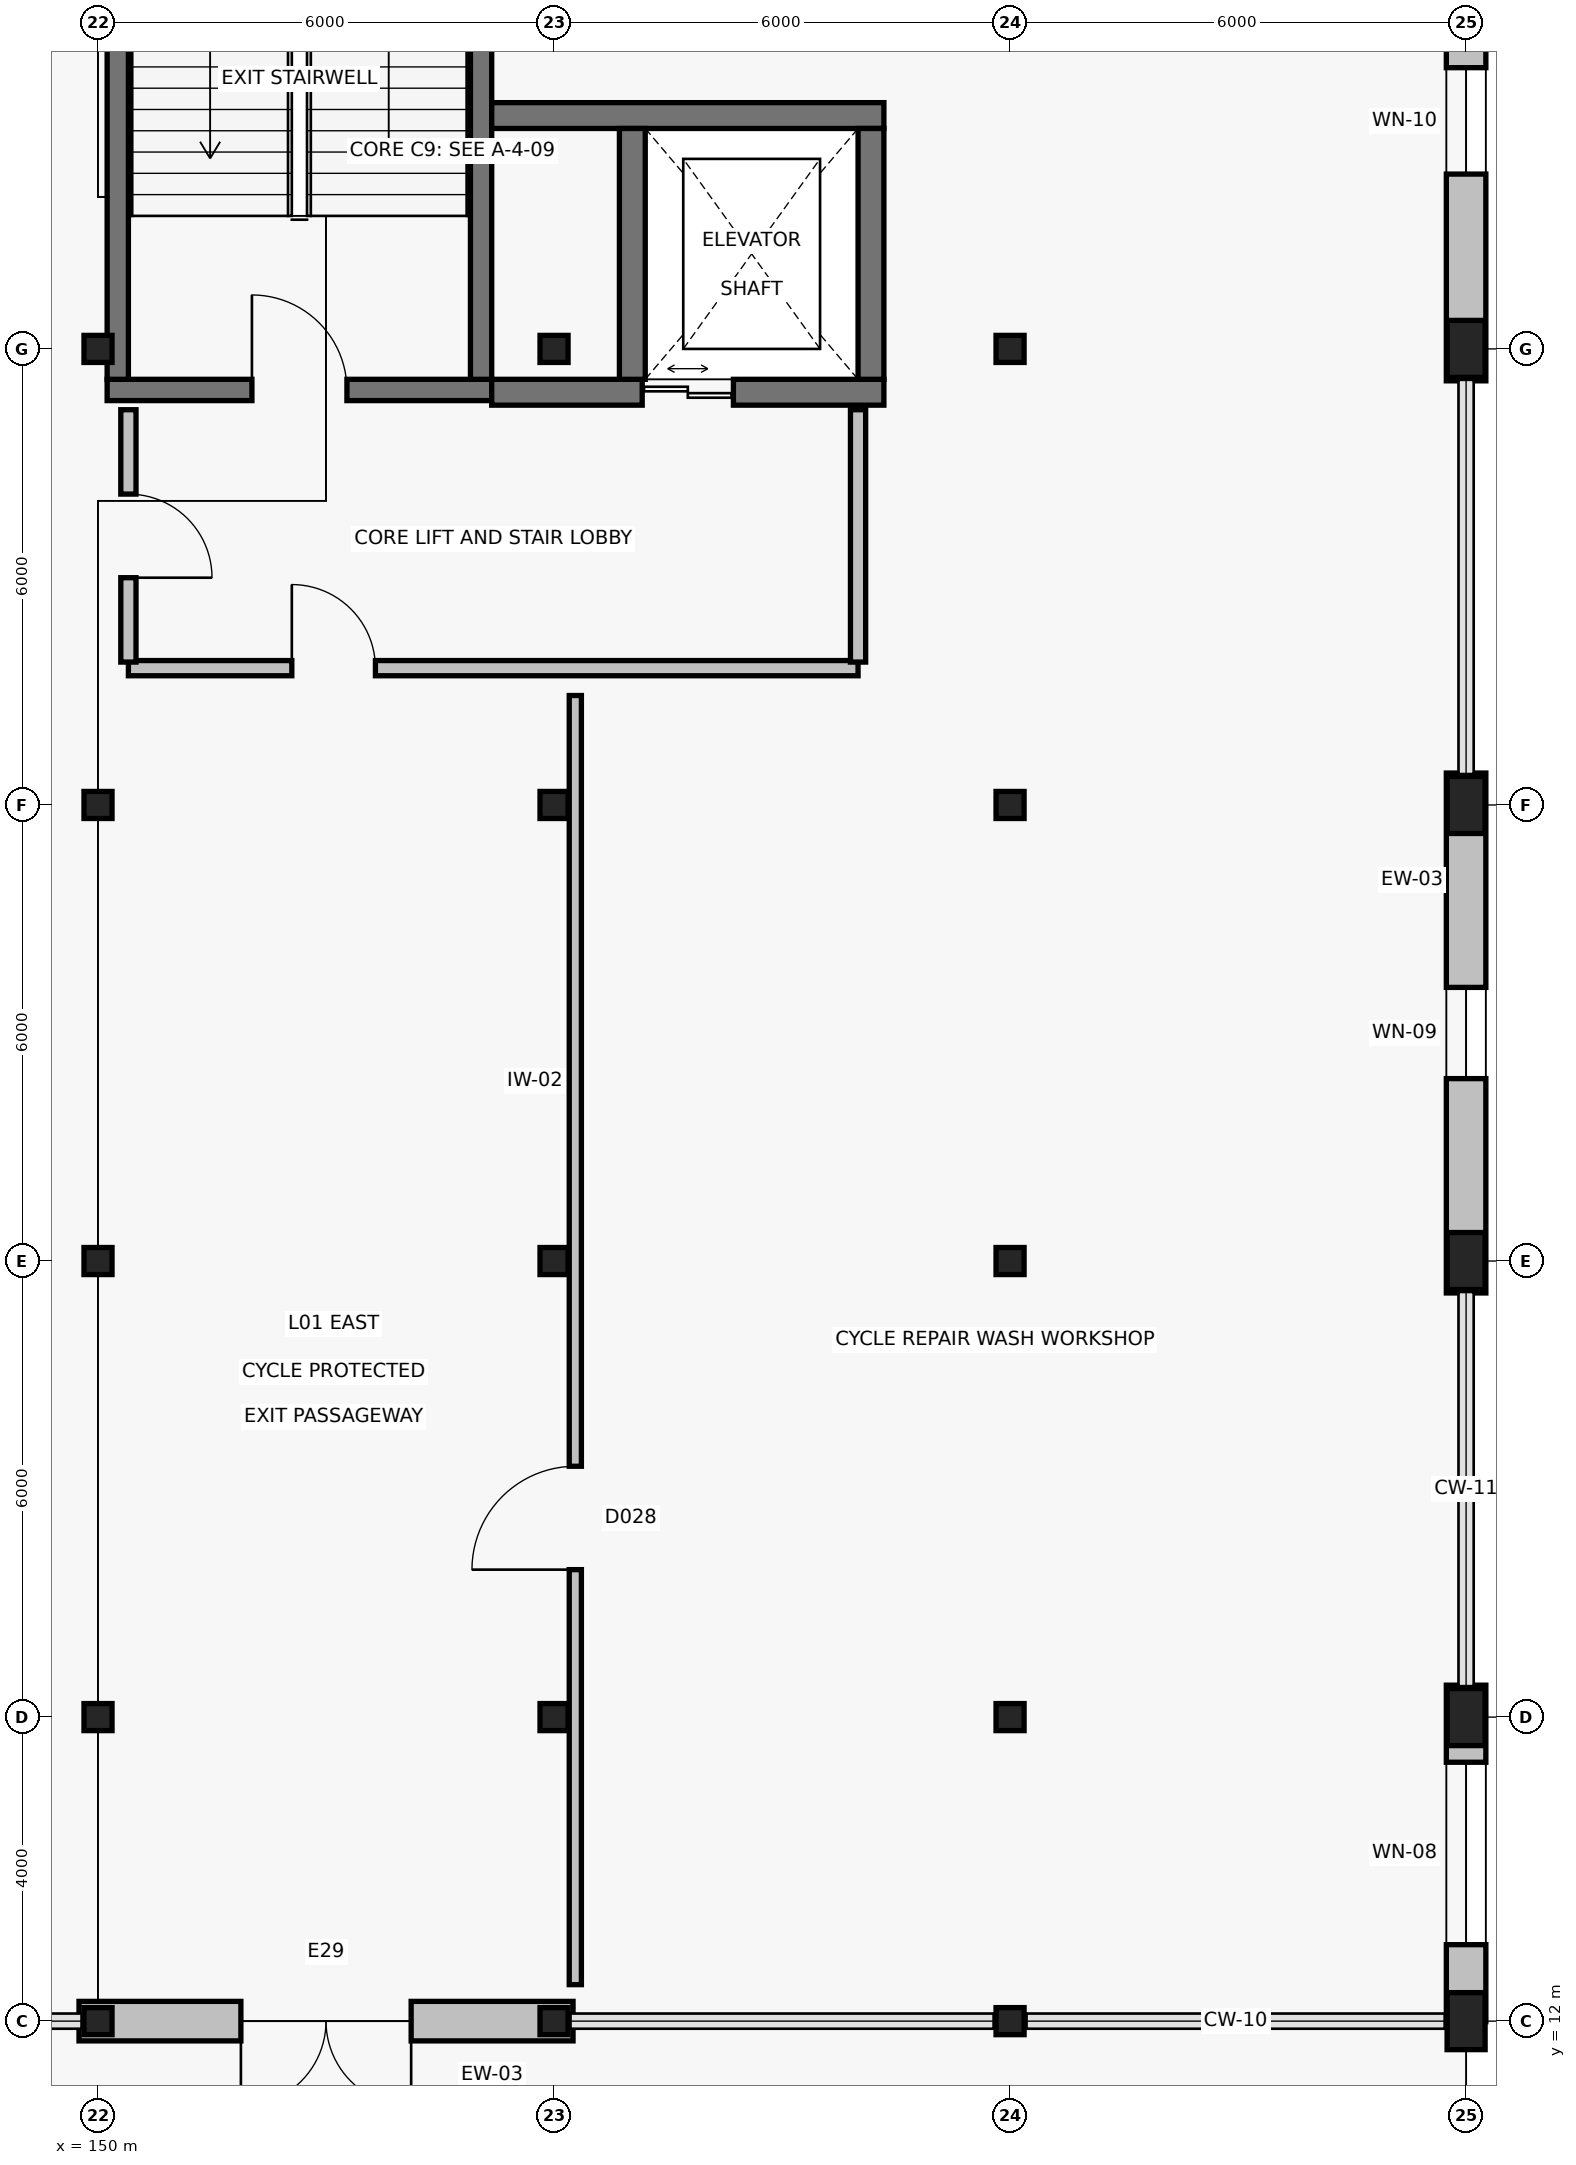
"""IFC4 building model, lengths in metres.
Left out: names, types, materials, properties, quantities, classifications, styles, units other than length and angle.
Written with IfcOpenShell. Run it as: python <this file> out.ifc"""

import sys

from ifc_helpers import new_model, si_unit, direction, frame, frame_2d, origin, origin_2d, place, context, subcontext, project, spatial, rectangle, i_section, extrude, element, fill, save


model = new_model("IFC4")
c1 = context("Model", 3, precision=1e-05, world=origin(), true_north=direction((0.0, 1.0)))
c2 = subcontext(c1, "Body", "Model", "MODEL_VIEW")
j1 = project(units=[si_unit("LENGTHUNIT", "METRE"), si_unit("PLANEANGLEUNIT", "RADIAN")], contexts=[c1])
p1 = place(None, origin())
s1 = spatial("IfcSite", under=j1, at=p1, CompositionType="ELEMENT")
p2 = place(p1, origin())
s2 = spatial("IfcBuilding", under=s1, at=p2, CompositionType="ELEMENT")
p3 = place(p2, origin())
s3 = spatial("IfcBuildingStorey", under=s2, at=p3, CompositionType="ELEMENT", Elevation=0.0)
for number, where, z_axis, x_axis in (
    (1, (150.0, 12.0, 0.0), (0.0, 0.0, 1.0), (1.0, 0.0, 0.0)),
    (2, (150.0, 16.0, 0.0), (0.0, 0.0, 1.0), (1.0, 0.0, 0.0)),
    (3, (150.0, 22.0, 0.0), (0.0, 0.0, 1.0), (1.0, 0.0, 0.0)),
    (4, (150.0, 28.0, 0.0), (0.0, 0.0, 1.0), (1.0, 0.0, 0.0)),
    (5, (150.0, 34.0, 0.0), (0.0, 0.0, 1.0), (1.0, 0.0, 0.0)),
    (6, (156.0, 12.0, 0.0), (0.0, 0.0, 1.0), (1.0, 0.0, 0.0)),
    (7, (156.0, 16.0, 0.0), (0.0, 0.0, 1.0), (1.0, 0.0, 0.0)),
    (8, (156.0, 22.0, 0.0), (0.0, 0.0, 1.0), (1.0, 0.0, 0.0)),
    (9, (156.0, 28.0, 0.0), (0.0, 0.0, 1.0), (1.0, 0.0, 0.0)),
    (10, (156.0, 34.0, 0.0), (0.0, 0.0, 1.0), (1.0, 0.0, 0.0)),
    (11, (162.0, 12.0, 0.0), (0.0, 0.0, 1.0), (1.0, 0.0, 0.0)),
    (12, (162.0, 16.0, 0.0), (0.0, 0.0, 1.0), (1.0, 0.0, 0.0)),
    (13, (162.0, 22.0, 0.0), (0.0, 0.0, 1.0), (1.0, 0.0, 0.0)),
    (14, (162.0, 28.0, 0.0), (0.0, 0.0, 1.0), (1.0, 0.0, 0.0)),
    (15, (162.0, 34.0, 0.0), (0.0, 0.0, 1.0), (1.0, 0.0, 0.0)),
):
    element("IfcColumn", number, at=place(p3, frame(where, z_axis=z_axis, x_axis=x_axis)), inside=s3, PredefinedType="COLUMN", context=c2, shape_type="SweptSolid", body=[
        extrude(i_section(OverallWidth=0.369, OverallDepth=0.356, WebThickness=0.011, FlangeThickness=0.018, FilletRadius=0.015, at=origin_2d()), origin(), (0.0, 0.0, 1.0), 6.6),
    ])
for number, where, z_axis, x_axis in (
    (16, (168.0, 12.0, 0.0), (0.0, 0.0, 1.0), (1.0, 0.0, 0.0)),
    (17, (168.0, 16.0, 0.0), (0.0, 0.0, 1.0), (1.0, 0.0, 0.0)),
    (18, (168.0, 22.0, 0.0), (0.0, 0.0, 1.0), (1.0, 0.0, 0.0)),
    (19, (168.0, 28.0, 0.0), (0.0, 0.0, 1.0), (1.0, 0.0, 0.0)),
    (20, (168.0, 34.0, 0.0), (0.0, 0.0, 1.0), (1.0, 0.0, 0.0)),
):
    element("IfcColumn", number, at=place(p3, frame(where, z_axis=z_axis, x_axis=x_axis)), inside=s3, PredefinedType="PILASTER", context=c2, shape_type="SweptSolid", body=[
        extrude(rectangle(XDim=0.5, YDim=0.75, at=origin_2d()), origin(), (0.0, 0.0, 1.0), 6.6),
    ])
p4 = place(p3, frame((156.25, 12.0, 0.0), z_axis=(0.0, 0.0, 1.0), x_axis=(-1.0, 0.0, 0.0)))
e21 = element("IfcWall", 21, at=p4, inside=s3, PredefinedType="SOLIDWALL", context=c2, shape_type="SweptSolid", body=[
    extrude(rectangle(XDim=6.5, YDim=0.52, at=frame_2d((3.25, 0.0))), origin(), (0.0, 0.0, 1.0), 5.761),
])
p5 = place(p4, frame((2.13, 0.0, 0.0)))
e22 = element("IfcOpeningElement", 22, at=p5, cuts=e21, PredefinedType="OPENING", context=c2, shape_type="SweptSolid", body=[
    extrude(rectangle(XDim=2.24, YDim=2.6, at=frame_2d((1.12, 1.3))), frame((0.0, 0.275, 0.0), z_axis=(0.0, -1.0, 0.0), x_axis=(1.0, 0.0, 0.0)), (0.0, 0.0, 1.0), 0.55),
])
p6 = place(p3, frame((168.0, 11.992, 0.0), z_axis=(0.0, 0.0, 1.0), x_axis=(0.0, 1.0, 0.0)))
e23 = element("IfcWall", 23, at=p6, inside=s3, PredefinedType="SOLIDWALL", context=c2, shape_type="SweptSolid", body=[
    extrude(rectangle(XDim=4.428, YDim=0.52, at=frame_2d((2.214, 0.0))), origin(), (0.0, 0.0, 1.0), 5.837),
])
p7 = place(p6, frame((1.014, 0.0, 0.9)))
e24 = element("IfcOpeningElement", 24, at=p7, cuts=e23, PredefinedType="OPENING", context=c2, shape_type="SweptSolid", body=[
    extrude(rectangle(XDim=2.4, YDim=1.8, at=frame_2d((1.2, 0.9))), frame((0.0, 0.275, 0.0), z_axis=(0.0, -1.0, 0.0), x_axis=(1.0, 0.0, 0.0)), (0.0, 0.0, 1.0), 0.55),
])
p8 = place(p3, frame((168.0, 21.58, 0.0), z_axis=(0.0, 0.0, 1.0), x_axis=(0.0, 1.0, 0.0)))
e25 = element("IfcWall", 25, at=p8, inside=s3, PredefinedType="SOLIDWALL", context=c2, shape_type="SweptSolid", body=[
    extrude(rectangle(XDim=6.84, YDim=0.52, at=frame_2d((3.42, 0.0))), origin(), (0.0, 0.0, 1.0), 5.837),
])
p9 = place(p8, frame((2.82, 0.0, 0.9)))
e26 = element("IfcOpeningElement", 26, at=p9, cuts=e25, PredefinedType="OPENING", context=c2, shape_type="SweptSolid", body=[
    extrude(rectangle(XDim=1.2, YDim=2.1, at=frame_2d((0.6, 1.05))), frame((0.0, 0.275, 0.0), z_axis=(0.0, -1.0, 0.0), x_axis=(1.0, 0.0, 0.0)), (0.0, 0.0, 1.0), 0.55),
])
p10 = place(p3, frame((168.0, 33.58, 0.0), z_axis=(0.0, 0.0, 1.0), x_axis=(0.0, 1.0, 0.0)))
e27 = element("IfcWall", 27, at=p10, inside=s3, PredefinedType="SOLIDWALL", context=c2, shape_type="SweptSolid", body=[
    extrude(rectangle(XDim=6.84, YDim=0.52, at=frame_2d((3.42, 0.0))), origin(), (0.0, 0.0, 1.0), 5.761),
])
p11 = place(p10, frame((2.72, 0.0, 0.9)))
e28 = element("IfcOpeningElement", 28, at=p11, cuts=e27, PredefinedType="OPENING", context=c2, shape_type="SweptSolid", body=[
    extrude(rectangle(XDim=1.4, YDim=2.1, at=frame_2d((0.7, 1.05))), frame((0.0, 0.275, 0.0), z_axis=(0.0, -1.0, 0.0), x_axis=(1.0, 0.0, 0.0)), (0.0, 0.0, 1.0), 0.55),
])
p12 = place(p3, frame((150.12, 33.46, 0.0), z_axis=(0.0, 0.0, 1.0), x_axis=(1.0, 0.0, 0.0)))
e29 = element("IfcWall", 29, at=p12, inside=s3, PredefinedType="SHEAR", context=c2, shape_type="SweptSolid", body=[
    extrude(rectangle(XDim=5.06, YDim=0.28, at=frame_2d((2.53, 0.0))), origin(), (0.0, 0.0, 1.0), 6.32),
])
p13 = place(p12, frame((1.905, 0.0, 0.0)))
e30 = element("IfcOpeningElement", 30, at=p13, cuts=e29, PredefinedType="OPENING", context=c2, shape_type="SweptSolid", body=[
    extrude(rectangle(XDim=1.25, YDim=2.2, at=frame_2d((0.625, 1.1))), frame((0.0, 0.155, 0.0), z_axis=(0.0, -1.0, 0.0), x_axis=(1.0, 0.0, 0.0)), (0.0, 0.0, 1.0), 0.31),
])
for number, where, z_axis, x_axis in (
    (31, (150.26, 43.4, 0.0), (0.0, 0.0, 1.0), (0.0, -1.0, 0.0)),
    (32, (155.04, 33.6, 0.0), (0.0, 0.0, 1.0), (0.0, 1.0, 0.0)),
):
    element("IfcWall", number, at=place(p3, frame(where, z_axis=z_axis, x_axis=x_axis)), inside=s3, PredefinedType="SHEAR", context=c2, shape_type="SweptSolid", body=[
        extrude(rectangle(XDim=9.8, YDim=0.28, at=frame_2d((4.9, 0.0))), origin(), (0.0, 0.0, 1.0), 6.32),
    ])
p14 = place(p3, frame((155.18, 33.43, 0.0), z_axis=(0.0, 0.0, 1.0), x_axis=(1.0, 0.0, 0.0)))
e33 = element("IfcWall", 33, at=p14, inside=s3, PredefinedType="SHEAR", context=c2, shape_type="SweptSolid", body=[
    extrude(rectangle(XDim=5.16, YDim=0.34, at=frame_2d((2.58, 0.0))), origin(), (0.0, 0.0, 1.0), 6.32),
])
p15 = place(p14, frame((1.98, 0.0, 0.0)))
e34 = element("IfcOpeningElement", 34, at=p15, cuts=e33, PredefinedType="OPENING", context=c2, shape_type="SweptSolid", body=[
    extrude(rectangle(XDim=1.2, YDim=2.2, at=frame_2d((0.6, 1.1))), frame((0.0, 0.185, 0.0), z_axis=(0.0, -1.0, 0.0), x_axis=(1.0, 0.0, 0.0)), (0.0, 0.0, 1.0), 0.37),
])
p16 = place(p3, frame((160.34, 37.07, 0.0), z_axis=(0.0, 0.0, 1.0), x_axis=(-1.0, 0.0, 0.0)))
e35 = element("IfcWall", 35, at=p16, inside=s3, PredefinedType="SHEAR", context=c2, shape_type="SweptSolid", body=[
    extrude(rectangle(XDim=5.16, YDim=0.34, at=frame_2d((2.58, 0.0))), origin(), (0.0, 0.0, 1.0), 6.32),
])
for number, where, z_axis, x_axis in (
    (36, (157.03, 36.9, 0.0), (0.0, 0.0, 1.0), (0.0, -1.0, 0.0)),
    (37, (160.17, 33.6, 0.0), (0.0, 0.0, 1.0), (0.0, 1.0, 0.0)),
):
    element("IfcWall", number, at=place(p3, frame(where, z_axis=z_axis, x_axis=x_axis)), inside=s3, PredefinedType="SHEAR", context=c2, shape_type="SweptSolid", body=[
        extrude(rectangle(XDim=3.3, YDim=0.34, at=frame_2d((1.65, 0.0))), origin(), (0.0, 0.0, 1.0), 6.32),
    ])
p17 = place(p3, frame((150.4, 29.8, 0.0), z_axis=(0.0, 0.0, 1.0), x_axis=(1.0, 0.0, 0.0)))
e38 = element("IfcWall", 38, at=p17, inside=s3, PredefinedType="PARTITIONING", context=c2, shape_type="SweptSolid", body=[
    extrude(rectangle(XDim=9.6, YDim=0.2, at=frame_2d((4.8, 0.0))), origin(), (0.0, 0.0, 1.0), 5.946),
])
p18 = place(p17, frame((2.15, 0.0, 0.0)))
e39 = element("IfcOpeningElement", 39, at=p18, cuts=e38, PredefinedType="OPENING", context=c2, shape_type="SweptSolid", body=[
    extrude(rectangle(XDim=1.1, YDim=2.15, at=frame_2d((0.55, 1.075))), frame((0.0, 0.115, 0.0), z_axis=(0.0, -1.0, 0.0), x_axis=(1.0, 0.0, 0.0)), (0.0, 0.0, 1.0), 0.23),
])
p19 = place(p3, frame((150.4, 33.2, 0.0), z_axis=(0.0, 0.0, 1.0), x_axis=(0.0, -1.0, 0.0)))
e40 = element("IfcWall", 40, at=p19, inside=s3, PredefinedType="PARTITIONING", context=c2, shape_type="SweptSolid", body=[
    extrude(rectangle(XDim=3.32, YDim=0.2, at=frame_2d((1.66, 0.0))), origin(), (0.0, 0.0, 1.0), 6.32),
])
p20 = place(p19, frame((1.11, 0.0, 0.0)))
e41 = element("IfcOpeningElement", 41, at=p20, cuts=e40, PredefinedType="OPENING", context=c2, shape_type="SweptSolid", body=[
    extrude(rectangle(XDim=1.1, YDim=2.15, at=frame_2d((0.55, 1.075))), frame((0.0, 0.115, 0.0), z_axis=(0.0, -1.0, 0.0), x_axis=(1.0, 0.0, 0.0)), (0.0, 0.0, 1.0), 0.23),
])
p21 = place(p3, frame((160.0, 29.88, 0.0), z_axis=(0.0, 0.0, 1.0), x_axis=(0.0, 1.0, 0.0)))
e42 = element("IfcWall", 42, at=p21, inside=s3, PredefinedType="PARTITIONING", context=c2, shape_type="SweptSolid", body=[
    extrude(rectangle(XDim=3.32, YDim=0.2, at=frame_2d((1.66, 0.0))), origin(), (0.0, 0.0, 1.0), 6.32),
])
p22 = place(p3, frame((156.28, 12.48, 0.0), z_axis=(0.0, 0.0, 1.0), x_axis=(0.0, 1.0, 0.0)))
e43 = element("IfcWall", 43, at=p22, inside=s3, PredefinedType="PARTITIONING", context=c2, shape_type="SweptSolid", body=[
    extrude(rectangle(XDim=16.96, YDim=0.16, at=frame_2d((8.48, 0.0))), origin(), (0.0, 0.0, 1.0), 5.761),
])
p23 = place(p22, frame((5.46, 0.0, 0.0)))
e44 = element("IfcOpeningElement", 44, at=p23, cuts=e43, PredefinedType="OPENING", context=c2, shape_type="SweptSolid", body=[
    extrude(rectangle(XDim=1.36, YDim=2.2, at=frame_2d((0.68, 1.1))), frame((0.0, 0.095, 0.0), z_axis=(0.0, -1.0, 0.0), x_axis=(1.0, 0.0, 0.0)), (0.0, 0.0, 1.0), 0.19),
])
p24 = place(p5, origin())
e45 = element("IfcDoor", 45, at=p24, inside=s3, OperationType="DOUBLE_DOOR_SINGLE_SWING", PredefinedType="DOOR", context=c2, shape_type="SweptSolid", body=[
    extrude(rectangle(XDim=2.24, YDim=2.6, at=frame_2d((1.12, 1.3))), frame((0.0, 0.025, 0.0), z_axis=(0.0, -1.0, 0.0), x_axis=(1.0, 0.0, 0.0)), (0.0, 0.0, 1.0), 0.05),
])
fill(e22, e45)
p25 = place(p7, origin())
e46 = element("IfcWindow", 46, at=p25, inside=s3, PartitioningType="SINGLE_PANEL", PredefinedType="WINDOW", context=c2, shape_type="SweptSolid", body=[
    extrude(rectangle(XDim=2.4, YDim=1.8, at=frame_2d((1.2, 0.9))), frame((0.0, 0.03, 0.0), z_axis=(0.0, -1.0, 0.0), x_axis=(1.0, 0.0, 0.0)), (0.0, 0.0, 1.0), 0.06),
])
fill(e24, e46)
p26 = place(p9, origin())
e47 = element("IfcWindow", 47, at=p26, inside=s3, PartitioningType="SINGLE_PANEL", PredefinedType="WINDOW", context=c2, shape_type="SweptSolid", body=[
    extrude(rectangle(XDim=1.2, YDim=2.1, at=frame_2d((0.6, 1.05))), frame((0.0, 0.03, 0.0), z_axis=(0.0, -1.0, 0.0), x_axis=(1.0, 0.0, 0.0)), (0.0, 0.0, 1.0), 0.06),
])
fill(e26, e47)
p27 = place(p11, origin())
e48 = element("IfcWindow", 48, at=p27, inside=s3, PartitioningType="SINGLE_PANEL", PredefinedType="WINDOW", context=c2, shape_type="SweptSolid", body=[
    extrude(rectangle(XDim=1.4, YDim=2.1, at=frame_2d((0.7, 1.05))), frame((0.0, 0.03, 0.0), z_axis=(0.0, -1.0, 0.0), x_axis=(1.0, 0.0, 0.0)), (0.0, 0.0, 1.0), 0.06),
])
fill(e28, e48)
p28 = place(p13, origin())
e49 = element("IfcDoor", 49, at=p28, inside=s3, OperationType="SINGLE_SWING_LEFT", PredefinedType="DOOR", context=c2, shape_type="SweptSolid", body=[
    extrude(rectangle(XDim=1.25, YDim=2.2, at=frame_2d((0.625, 1.1))), frame((0.0, 0.025, 0.0), z_axis=(0.0, -1.0, 0.0), x_axis=(1.0, 0.0, 0.0)), (0.0, 0.0, 1.0), 0.05),
])
fill(e30, e49)
p29 = place(p15, origin())
e50 = element("IfcDoor", 50, at=p29, inside=s3, OperationType="DOUBLE_DOOR_SLIDING", PredefinedType="DOOR", context=c2, shape_type="SweptSolid", body=[
    extrude(rectangle(XDim=1.2, YDim=2.2, at=frame_2d((0.6, 1.1))), frame((0.0, 0.025, 0.0), z_axis=(0.0, -1.0, 0.0), x_axis=(1.0, 0.0, 0.0)), (0.0, 0.0, 1.0), 0.05),
])
fill(e34, e50)
p30 = place(p20, origin())
e51 = element("IfcDoor", 51, at=p30, inside=s3, OperationType="SINGLE_SWING_RIGHT", PredefinedType="DOOR", context=c2, shape_type="SweptSolid", body=[
    extrude(rectangle(XDim=1.1, YDim=2.15, at=frame_2d((0.55, 1.075))), frame((0.0, 0.025, 0.0), z_axis=(0.0, -1.0, 0.0), x_axis=(1.0, 0.0, 0.0)), (0.0, 0.0, 1.0), 0.05),
])
fill(e41, e51)
p31 = place(p18, origin())
e52 = element("IfcDoor", 52, at=p31, inside=s3, OperationType="SINGLE_SWING_LEFT", PredefinedType="DOOR", context=c2, shape_type="SweptSolid", body=[
    extrude(rectangle(XDim=1.1, YDim=2.15, at=frame_2d((0.55, 1.075))), frame((0.0, 0.025, 0.0), z_axis=(0.0, -1.0, 0.0), x_axis=(1.0, 0.0, 0.0)), (0.0, 0.0, 1.0), 0.05),
])
fill(e39, e52)
p32 = place(p23, origin())
e53 = element("IfcDoor", 53, at=p32, inside=s3, OperationType="SINGLE_SWING_LEFT", PredefinedType="DOOR", context=c2, shape_type="SweptSolid", body=[
    extrude(rectangle(XDim=1.36, YDim=2.2, at=frame_2d((0.68, 1.1))), frame((0.0, 0.025, 0.0), z_axis=(0.0, -1.0, 0.0), x_axis=(1.0, 0.0, 0.0)), (0.0, 0.0, 1.0), 0.05),
])
fill(e44, e53)
save(model, sys.argv[1])
